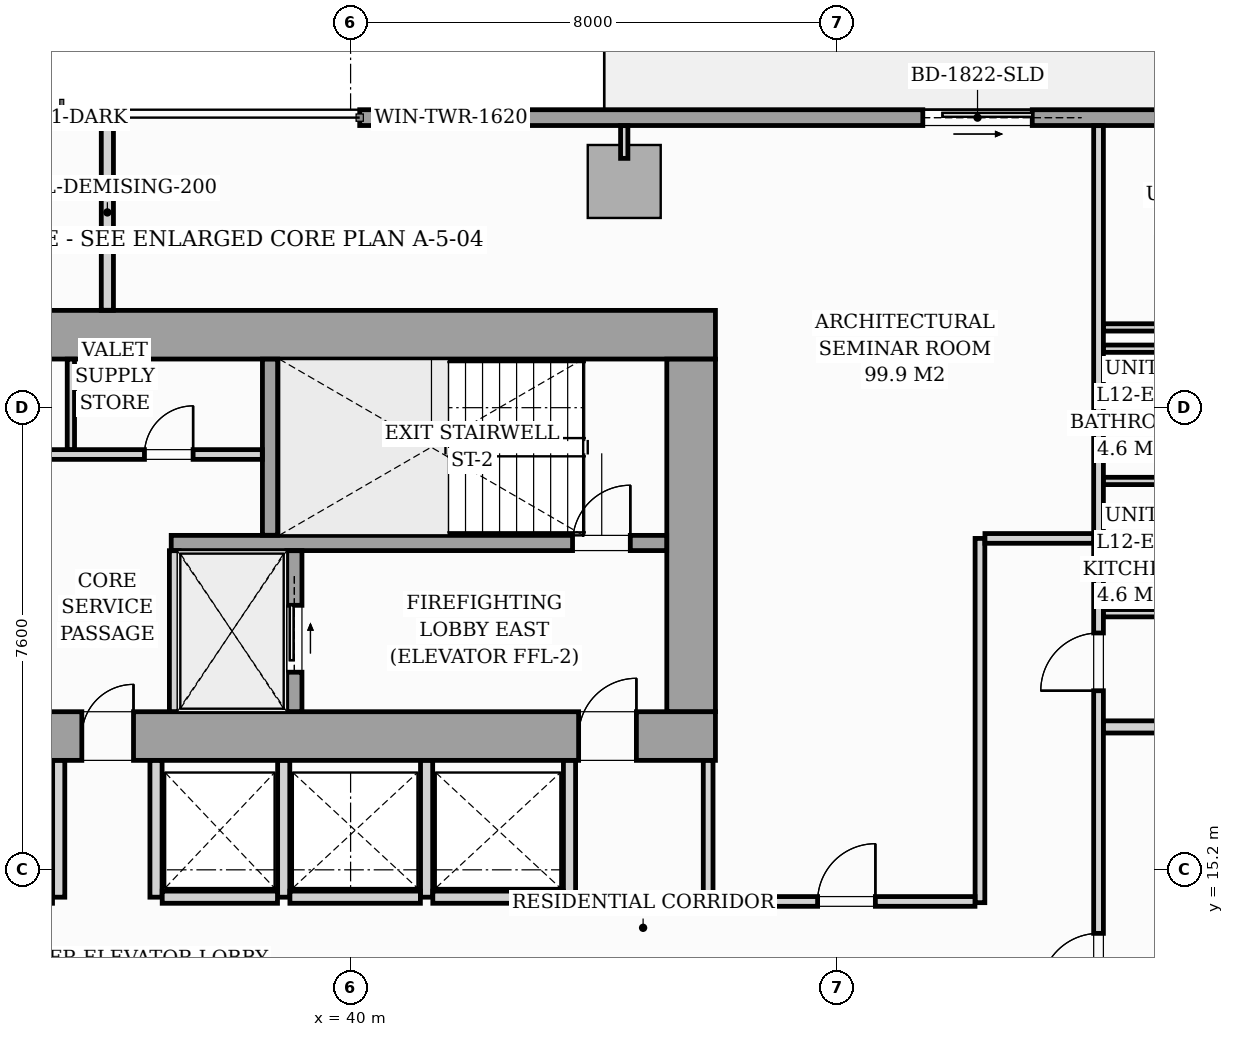
"""IFC4 building model, lengths in metres.
Left out: names, types, materials, properties, quantities, classifications, styles, units other than length and angle.
Written with IfcOpenShell. Run it as: python <this file> out.ifc"""

import sys

from ifc_helpers import new_model, si_unit, direction, frame, frame_2d, origin, origin_2d, place, context, subcontext, project, spatial, rectangle, i_section, extrude, source, transform, mapped, element, fill, save


model = new_model("IFC4")
c1 = context("Model", 3, precision=1e-05, world=origin(), true_north=direction((0.0, 1.0)))
c2 = subcontext(c1, "Body", "Model", "MODEL_VIEW")
j1 = project(units=[si_unit("LENGTHUNIT", "METRE"), si_unit("PLANEANGLEUNIT", "RADIAN")], contexts=[c1])
p1 = place(None, origin())
s1 = spatial("IfcSite", under=j1, at=p1, CompositionType="ELEMENT")
p2 = place(p1, origin())
s2 = spatial("IfcBuilding", under=s1, at=p2, CompositionType="ELEMENT")
p3 = place(p2, frame((0.0, 0.0, 45.4)))
s3 = spatial("IfcBuildingStorey", under=s2, at=p3, CompositionType="ELEMENT", Elevation=45.4)
m1 = source(origin(), c2, "Body", "SweptSolid", [
    extrude(i_section(OverallWidth=0.437, OverallDepth=0.514, WebThickness=0.061, FlangeThickness=0.097, FilletRadius=0.018, at=origin_2d()), origin(), (0.0, 0.0, 1.0), 3.196),
])
for number, where, z_axis, x_axis in (
    (1, (38.88, 17.4, 0.002), (0.0, 0.0, 1.0), (1.0, 0.0, 0.0)),
    (2, (45.6, 17.4, 0.002), (0.0, 0.0, 1.0), (1.0, 0.0, 0.0)),
    (3, (38.88, 24.0, 0.002), (0.0, 0.0, 1.0), (1.0, 0.0, 0.0)),
    (4, (45.6, 24.0, 0.002), (0.0, 0.0, 1.0), (1.0, 0.0, 0.0)),
):
    element("IfcColumn", number, at=place(p3, frame(where, z_axis=z_axis, x_axis=x_axis)), inside=s3, PredefinedType="PILASTER", context=c2, shape_type="MappedRepresentation", body=[
        mapped(m1, transform((0.0, 0.0, 0.0), scale=1.0)),
    ])
m2 = source(origin(), c2, "Body", "SweptSolid", [
    extrude(rectangle(XDim=1.2, YDim=1.2, at=origin_2d()), origin(), (0.0, 0.0, 1.0), 3.196),
])
p4 = place(p3, frame((44.5, 26.52, 0.002), z_axis=(0.0, 0.0, 1.0), x_axis=(1.0, 0.0, 0.0)))
e5 = element("IfcColumn", 5, at=p4, inside=s3, PredefinedType="COLUMN", context=c2, shape_type="MappedRepresentation", body=[
    mapped(m2, transform((0.0, 0.0, 0.0), scale=1.0)),
])
p5 = place(p3, frame((40.15, 27.57, 0.0), z_axis=(0.0, 0.0, 1.0), x_axis=(1.0, 0.0, 0.0)))
e6 = element("IfcWall", 6, at=p5, inside=s3, PredefinedType="STANDARD", context=c2, shape_type="SweptSolid", body=[
    extrude(rectangle(XDim=17.15, YDim=0.26, at=frame_2d((8.575, 0.0))), origin(), (0.0, 0.0, 1.0), 2.94),
])
p6 = place(p5, frame((9.26, 0.0, 0.0)))
e7 = element("IfcOpeningElement", 7, at=p6, cuts=e6, PredefinedType="OPENING", context=c2, shape_type="SweptSolid", body=[
    extrude(rectangle(XDim=1.8, YDim=2.06, at=frame_2d((0.9, 1.03))), frame((0.0, 0.14, 0.0), z_axis=(0.0, -1.0, 0.0), x_axis=(1.0, 0.0, 0.0)), (0.0, 0.0, 1.0), 0.28),
])
p7 = place(p5, frame((0.7, 0.0, 0.65)))
e8 = element("IfcOpeningElement", 8, at=p7, cuts=e6, PredefinedType="OPENING", context=c2, shape_type="SweptSolid", body=[
    extrude(rectangle(XDim=1.6, YDim=1.5, at=frame_2d((0.8, 0.75))), frame((0.0, 0.14, 0.0), z_axis=(0.0, -1.0, 0.0), x_axis=(1.0, 0.0, 0.0)), (0.0, 0.0, 1.0), 0.28),
])
p8 = place(p3, frame((26.0, 17.4, 0.0), z_axis=(0.0, 0.0, 1.0), x_axis=(1.0, 0.0, 0.0)))
e9 = element("IfcWall", 9, at=p8, inside=s3, PredefinedType="SHEAR", context=c2, shape_type="SweptSolid", body=[
    extrude(rectangle(XDim=20.0, YDim=0.8, at=frame_2d((10.0, 0.0))), origin(), (0.0, 0.0, 1.0), 3.2),
])
p9 = place(p8, frame((1.15, 0.0, 0.0)))
e10 = element("IfcOpeningElement", 10, at=p9, cuts=e9, PredefinedType="OPENING", context=c2, shape_type="SweptSolid", body=[
    extrude(rectangle(XDim=0.95, YDim=2.06, at=frame_2d((0.475, 1.03))), frame((0.0, 0.41, 0.0), z_axis=(0.0, -1.0, 0.0), x_axis=(1.0, 0.0, 0.0)), (0.0, 0.0, 1.0), 0.82),
])
p10 = place(p8, frame((9.58, 0.0, 0.0)))
e11 = element("IfcOpeningElement", 11, at=p10, cuts=e9, PredefinedType="OPENING", context=c2, shape_type="SweptSolid", body=[
    extrude(rectangle(XDim=0.85, YDim=2.0, at=frame_2d((0.425, 1.0))), frame((0.0, 0.41, 0.0), z_axis=(0.0, -1.0, 0.0), x_axis=(1.0, 0.0, 0.0)), (0.0, 0.0, 1.0), 0.82),
])
p11 = place(p8, frame((17.75, 0.0, 0.0)))
e12 = element("IfcOpeningElement", 12, at=p11, cuts=e9, PredefinedType="OPENING", context=c2, shape_type="SweptSolid", body=[
    extrude(rectangle(XDim=0.95, YDim=2.06, at=frame_2d((0.475, 1.03))), frame((0.0, 0.41, 0.0), z_axis=(0.0, -1.0, 0.0), x_axis=(1.0, 0.0, 0.0)), (0.0, 0.0, 1.0), 0.82),
])
p12 = place(p3, frame((26.0, 24.0, 0.0), z_axis=(0.0, 0.0, 1.0), x_axis=(1.0, 0.0, 0.0)))
e13 = element("IfcWall", 13, at=p12, inside=s3, PredefinedType="SHEAR", context=c2, shape_type="SweptSolid", body=[
    extrude(rectangle(XDim=20.0, YDim=0.8, at=frame_2d((10.0, 0.0))), origin(), (0.0, 0.0, 1.0), 3.2),
])
p13 = place(p3, frame((45.6, 17.802, 0.0), z_axis=(0.0, 0.0, 1.0), x_axis=(0.0, 1.0, 0.0)))
e14 = element("IfcWall", 14, at=p13, inside=s3, PredefinedType="SHEAR", context=c2, shape_type="SweptSolid", body=[
    extrude(rectangle(XDim=5.796, YDim=0.8, at=frame_2d((2.898, 0.0))), origin(), (0.0, 0.0, 1.0), 3.2),
])
p14 = place(p3, frame((37.05, 20.575, 0.0), z_axis=(0.0, 0.0, 1.0), x_axis=(1.0, 0.0, 0.0)))
e15 = element("IfcWall", 15, at=p14, inside=s3, PredefinedType="SOLIDWALL", context=c2, shape_type="SweptSolid", body=[
    extrude(rectangle(XDim=8.148, YDim=0.25, at=frame_2d((4.074, 0.0))), origin(), (0.0, 0.0, 1.0), 3.2),
])
p15 = place(p14, frame((6.6, 0.0, 0.0)))
e16 = element("IfcOpeningElement", 16, at=p15, cuts=e15, PredefinedType="OPENING", context=c2, shape_type="SweptSolid", body=[
    extrude(rectangle(XDim=0.95, YDim=2.06, at=frame_2d((0.475, 1.03))), frame((0.0, 0.135, 0.0), z_axis=(0.0, -1.0, 0.0), x_axis=(1.0, 0.0, 0.0)), (0.0, 0.0, 1.0), 0.27),
])
p16 = place(p3, frame((38.675, 20.702, 0.0), z_axis=(0.0, 0.0, 1.0), x_axis=(0.0, 1.0, 0.0)))
e17 = element("IfcWall", 17, at=p16, inside=s3, PredefinedType="SOLIDWALL", context=c2, shape_type="SweptSolid", body=[
    extrude(rectangle(XDim=2.896, YDim=0.25, at=frame_2d((1.448, 0.0))), origin(), (0.0, 0.0, 1.0), 3.2),
])
p17 = place(p3, frame((37.1, 17.802, 0.0), z_axis=(0.0, 0.0, 1.0), x_axis=(0.0, 1.0, 0.0)))
e18 = element("IfcWall", 18, at=p17, inside=s3, PredefinedType="PARTITIONING", context=c2, shape_type="SweptSolid", body=[
    extrude(rectangle(XDim=2.646, YDim=0.16, at=frame_2d((1.323, 0.0))), origin(), (0.0, 0.0, 1.0), 2.94),
])
p18 = place(p3, frame((39.075, 17.802, 0.0), z_axis=(0.0, 0.0, 1.0), x_axis=(0.0, 1.0, 0.0)))
e19 = element("IfcWall", 19, at=p18, inside=s3, PredefinedType="SOLIDWALL", context=c2, shape_type="SweptSolid", body=[
    extrude(rectangle(XDim=2.646, YDim=0.25, at=frame_2d((1.323, 0.0))), origin(), (0.0, 0.0, 1.0), 3.2),
])
p19 = place(p18, frame((0.648, 0.0, 0.0)))
e20 = element("IfcOpeningElement", 20, at=p19, cuts=e19, PredefinedType="OPENING", context=c2, shape_type="SweptSolid", body=[
    extrude(rectangle(XDim=1.1, YDim=2.08, at=frame_2d((0.55, 1.04))), frame((0.0, 0.135, 0.0), z_axis=(0.0, -1.0, 0.0), x_axis=(1.0, 0.0, 0.0)), (0.0, 0.0, 1.0), 0.27),
])
p20 = place(p3, frame((33.452, 22.03, 0.0), z_axis=(0.0, 0.0, 1.0), x_axis=(1.0, 0.0, 0.0)))
e21 = element("IfcWall", 21, at=p20, inside=s3, PredefinedType="PARTITIONING", context=c2, shape_type="SweptSolid", body=[
    extrude(rectangle(XDim=5.096, YDim=0.16, at=frame_2d((2.548, 0.0))), origin(), (0.0, 0.0, 1.0), 2.94),
])
p21 = place(p20, frame((0.538, 0.0, 0.0)))
e22 = element("IfcOpeningElement", 22, at=p21, cuts=e21, PredefinedType="OPENING", context=c2, shape_type="SweptSolid", body=[
    extrude(rectangle(XDim=0.8, YDim=2.05, at=frame_2d((0.4, 1.025))), frame((0.0, 0.09, 0.0), z_axis=(0.0, -1.0, 0.0), x_axis=(1.0, 0.0, 0.0)), (0.0, 0.0, 1.0), 0.18),
])
p22 = place(p20, frame((3.158, 0.0, 0.0)))
e23 = element("IfcOpeningElement", 23, at=p22, cuts=e21, PredefinedType="OPENING", context=c2, shape_type="SweptSolid", body=[
    extrude(rectangle(XDim=0.8, YDim=2.05, at=frame_2d((0.4, 1.025))), frame((0.0, 0.09, 0.0), z_axis=(0.0, -1.0, 0.0), x_axis=(1.0, 0.0, 0.0)), (0.0, 0.0, 1.0), 0.18),
])
p23 = place(p3, frame((35.4, 22.112, 0.0), z_axis=(0.0, 0.0, 1.0), x_axis=(0.0, 1.0, 0.0)))
e24 = element("IfcWall", 24, at=p23, inside=s3, PredefinedType="PARTITIONING", context=c2, shape_type="SweptSolid", body=[
    extrude(rectangle(XDim=1.486, YDim=0.12, at=frame_2d((0.743, 0.0))), origin(), (0.0, 0.0, 1.0), 2.94),
])
for number, where, z_axis, x_axis in (
    (25, (35.2, 14.75, 0.0), (0.0, 0.0, 1.0), (0.0, 1.0, 0.0)),
    (26, (36.8, 14.75, 0.0), (0.0, 0.0, 1.0), (0.0, 1.0, 0.0)),
    (27, (38.9, 14.75, 0.0), (0.0, 0.0, 1.0), (0.0, 1.0, 0.0)),
):
    element("IfcWall", number, at=place(p3, frame(where, z_axis=z_axis, x_axis=x_axis)), inside=s3, PredefinedType="PARTITIONING", context=c2, shape_type="SweptSolid", body=[
        extrude(rectangle(XDim=2.248, YDim=0.2, at=frame_2d((1.124, 0.0))), origin(), (0.0, 0.0, 1.0), 2.94),
    ])
p24 = place(p3, frame((36.902, 14.75, 0.0), z_axis=(0.0, 0.0, 1.0), x_axis=(1.0, 0.0, 0.0)))
e28 = element("IfcWall", 28, at=p24, inside=s3, PredefinedType="PARTITIONING", context=c2, shape_type="SweptSolid", body=[
    extrude(rectangle(XDim=1.896, YDim=0.2, at=frame_2d((0.948, 0.0))), origin(), (0.0, 0.0, 1.0), 2.94),
])
for number, where, z_axis, x_axis in (
    (29, (41.25, 14.75, 0.0), (0.0, 0.0, 1.0), (0.0, 1.0, 0.0)),
    (30, (43.6, 14.75, 0.0), (0.0, 0.0, 1.0), (0.0, 1.0, 0.0)),
):
    element("IfcWall", number, at=place(p3, frame(where, z_axis=z_axis, x_axis=x_axis)), inside=s3, PredefinedType="PARTITIONING", context=c2, shape_type="SweptSolid", body=[
        extrude(rectangle(XDim=2.248, YDim=0.2, at=frame_2d((1.124, 0.0))), origin(), (0.0, 0.0, 1.0), 2.94),
    ])
for number, where, z_axis, x_axis in (
    (31, (39.002, 14.75, 0.0), (0.0, 0.0, 1.0), (1.0, 0.0, 0.0)),
    (32, (41.352, 14.75, 0.0), (0.0, 0.0, 1.0), (1.0, 0.0, 0.0)),
):
    element("IfcWall", number, at=place(p3, frame(where, z_axis=z_axis, x_axis=x_axis)), inside=s3, PredefinedType="PARTITIONING", context=c2, shape_type="SweptSolid", body=[
        extrude(rectangle(XDim=2.146, YDim=0.2, at=frame_2d((1.073, 0.0))), origin(), (0.0, 0.0, 1.0), 2.94),
    ])
p25 = place(p3, frame((52.3, 12.712, 0.0), z_axis=(0.0, 0.0, 1.0), x_axis=(0.0, 1.0, 0.0)))
e33 = element("IfcWall", 33, at=p25, inside=s3, PredefinedType="PARTITIONING", context=c2, shape_type="SweptSolid", body=[
    extrude(rectangle(XDim=14.726, YDim=0.16, at=frame_2d((7.363, 0.0))), origin(), (0.0, 0.0, 1.0), 2.94),
])
p26 = place(p25, frame((0.493, 0.0, 0.0)))
e34 = element("IfcOpeningElement", 34, at=p26, cuts=e33, PredefinedType="OPENING", context=c2, shape_type="SweptSolid", body=[
    extrude(rectangle(XDim=0.95, YDim=2.06, at=frame_2d((0.475, 1.03))), frame((0.0, 0.09, 0.0), z_axis=(0.0, -1.0, 0.0), x_axis=(1.0, 0.0, 0.0)), (0.0, 0.0, 1.0), 0.18),
])
p27 = place(p25, frame((5.433, 0.0, 0.0)))
e35 = element("IfcOpeningElement", 35, at=p27, cuts=e33, PredefinedType="OPENING", context=c2, shape_type="SweptSolid", body=[
    extrude(rectangle(XDim=0.95, YDim=2.06, at=frame_2d((0.475, 1.03))), frame((0.0, 0.09, 0.0), z_axis=(0.0, -1.0, 0.0), x_axis=(1.0, 0.0, 0.0)), (0.0, 0.0, 1.0), 0.18),
])
p28 = place(p3, frame((36.0, 24.402, 0.0), z_axis=(0.0, 0.0, 1.0), x_axis=(0.0, 1.0, 0.0)))
e36 = element("IfcWall", 36, at=p28, inside=s3, PredefinedType="PARTITIONING", context=c2, shape_type="SweptSolid", body=[
    extrude(rectangle(XDim=3.218, YDim=0.2, at=frame_2d((1.609, 0.0))), origin(), (0.0, 0.0, 1.0), 2.94),
])
p29 = place(p3, frame((52.382, 17.55, 0.0), z_axis=(0.0, 0.0, 1.0), x_axis=(1.0, 0.0, 0.0)))
e37 = element("IfcWall", 37, at=p29, inside=s3, PredefinedType="PARTITIONING", context=c2, shape_type="SweptSolid", body=[
    extrude(rectangle(XDim=7.338, YDim=0.2, at=frame_2d((3.669, 0.0))), origin(), (0.0, 0.0, 1.0), 2.94),
])
for number, where, z_axis, x_axis in (
    (38, (52.382, 21.595, 0.0), (0.0, 0.0, 1.0), (1.0, 0.0, 0.0)),
    (39, (52.382, 19.42, 0.0), (0.0, 0.0, 1.0), (1.0, 0.0, 0.0)),
    (40, (52.382, 23.77, 0.0), (0.0, 0.0, 1.0), (1.0, 0.0, 0.0)),
):
    element("IfcWall", number, at=place(p3, frame(where, z_axis=z_axis, x_axis=x_axis)), inside=s3, PredefinedType="PARTITIONING", context=c2, shape_type="SweptSolid", body=[
        extrude(rectangle(XDim=2.256, YDim=0.12, at=frame_2d((1.128, 0.0))), origin(), (0.0, 0.0, 1.0), 2.94),
    ])
p30 = place(p3, frame((52.382, 24.12, 0.0), z_axis=(0.0, 0.0, 1.0), x_axis=(1.0, 0.0, 0.0)))
e41 = element("IfcWall", 41, at=p30, inside=s3, PredefinedType="PARTITIONING", context=c2, shape_type="SweptSolid", body=[
    extrude(rectangle(XDim=7.338, YDim=0.12, at=frame_2d((3.669, 0.0))), origin(), (0.0, 0.0, 1.0), 2.94),
])
p31 = place(p30, frame((3.253, 0.0, 0.0)))
e42 = element("IfcOpeningElement", 42, at=p31, cuts=e41, PredefinedType="OPENING", context=c2, shape_type="SweptSolid", body=[
    extrude(rectangle(XDim=0.85, YDim=2.05, at=frame_2d((0.425, 1.025))), frame((0.0, 0.07, 0.0), z_axis=(0.0, -1.0, 0.0), x_axis=(1.0, 0.0, 0.0)), (0.0, 0.0, 1.0), 0.14),
])
p32 = place(p3, frame((50.35, 14.66, 0.0), z_axis=(0.0, 0.0, 1.0), x_axis=(0.0, 1.0, 0.0)))
e43 = element("IfcWall", 43, at=p32, inside=s3, PredefinedType="PARTITIONING", context=c2, shape_type="SweptSolid", body=[
    extrude(rectangle(XDim=5.99, YDim=0.16, at=frame_2d((2.995, 0.0))), origin(), (0.0, 0.0, 1.0), 2.94),
])
p33 = place(p3, frame((50.432, 20.65, 0.0), z_axis=(0.0, 0.0, 1.0), x_axis=(1.0, 0.0, 0.0)))
e44 = element("IfcWall", 44, at=p33, inside=s3, PredefinedType="PARTITIONING", context=c2, shape_type="SweptSolid", body=[
    extrude(rectangle(XDim=1.786, YDim=0.16, at=frame_2d((0.893, 0.0))), origin(), (0.0, 0.0, 1.0), 2.94),
])
p34 = place(p3, frame((45.84, 14.68, 0.0), z_axis=(0.0, 0.0, 1.0), x_axis=(1.0, 0.0, 0.0)))
e45 = element("IfcWall", 45, at=p34, inside=s3, PredefinedType="PARTITIONING", context=c2, shape_type="SweptSolid", body=[
    extrude(rectangle(XDim=4.428, YDim=0.16, at=frame_2d((2.214, 0.0))), origin(), (0.0, 0.0, 1.0), 2.94),
])
p35 = place(p34, frame((1.84, 0.0, 0.0)))
e46 = element("IfcOpeningElement", 46, at=p35, cuts=e45, PredefinedType="OPENING", context=c2, shape_type="SweptSolid", body=[
    extrude(rectangle(XDim=0.95, YDim=2.06, at=frame_2d((0.475, 1.03))), frame((0.0, 0.09, 0.0), z_axis=(0.0, -1.0, 0.0), x_axis=(1.0, 0.0, 0.0)), (0.0, 0.0, 1.0), 0.18),
])
p36 = place(p3, frame((45.88, 14.762, 0.0), z_axis=(0.0, 0.0, 1.0), x_axis=(0.0, 1.0, 0.0)))
e47 = element("IfcWall", 47, at=p36, inside=s3, PredefinedType="PARTITIONING", context=c2, shape_type="SweptSolid", body=[
    extrude(rectangle(XDim=2.236, YDim=0.16, at=frame_2d((1.118, 0.0))), origin(), (0.0, 0.0, 1.0), 2.94),
])
p37 = place(p3, frame((44.5, 26.9, 0.0), z_axis=(0.0, 0.0, 1.0), x_axis=(0.0, 1.0, 0.0)))
e48 = element("IfcWall", 48, at=p37, inside=s3, PredefinedType="PARTITIONING", context=c2, shape_type="SweptSolid", body=[
    extrude(rectangle(XDim=0.538, YDim=0.12, at=frame_2d((0.269, 0.0))), origin(), (0.0, 0.0, 1.0), 2.94),
])
m3 = source(origin(), c2, "Body", "SweptSolid", [
    extrude(rectangle(XDim=1.8, YDim=2.06, at=frame_2d((0.9, 1.03))), frame((0.0, 0.025, 0.0), z_axis=(0.0, -1.0, 0.0), x_axis=(1.0, 0.0, 0.0)), (0.0, 0.0, 1.0), 0.05),
])
p38 = place(p6, origin())
e49 = element("IfcDoor", 49, at=p38, inside=s3, OperationType="SLIDING_TO_RIGHT", PredefinedType="DOOR", context=c2, shape_type="MappedRepresentation", body=[
    mapped(m3, transform((0.0, 0.0, 0.0), scale=1.0)),
])
fill(e7, e49)
m4 = source(origin(), c2, "Body", "SweptSolid", [
    extrude(rectangle(XDim=1.6, YDim=1.5, at=frame_2d((0.8, 0.75))), frame((0.0, 0.03, 0.0), z_axis=(0.0, -1.0, 0.0), x_axis=(1.0, 0.0, 0.0)), (0.0, 0.0, 1.0), 0.06),
])
p39 = place(p7, origin())
e50 = element("IfcWindow", 50, at=p39, inside=s3, PartitioningType="SINGLE_PANEL", PredefinedType="WINDOW", context=c2, shape_type="MappedRepresentation", body=[
    mapped(m4, transform((0.0, 0.0, 0.0), scale=1.0)),
])
fill(e8, e50)
m5 = source(origin(), c2, "Body", "SweptSolid", [
    extrude(rectangle(XDim=0.85, YDim=2.0, at=frame_2d((0.425, 1.0))), frame((0.0, 0.025, 0.0), z_axis=(0.0, -1.0, 0.0), x_axis=(1.0, 0.0, 0.0)), (0.0, 0.0, 1.0), 0.05),
])
p40 = place(p10, origin())
e51 = element("IfcDoor", 51, at=p40, inside=s3, OperationType="SINGLE_SWING_RIGHT", PredefinedType="DOOR", context=c2, shape_type="MappedRepresentation", body=[
    mapped(m5, transform((0.0, 0.0, 0.0), scale=1.0)),
])
fill(e11, e51)
m6 = source(origin(), c2, "Body", "SweptSolid", [
    extrude(rectangle(XDim=0.95, YDim=2.06, at=frame_2d((0.475, 1.03))), frame((0.0, 0.025, 0.0), z_axis=(0.0, -1.0, 0.0), x_axis=(1.0, 0.0, 0.0)), (0.0, 0.0, 1.0), 0.05),
])
p41 = place(p11, origin())
e52 = element("IfcDoor", 52, at=p41, inside=s3, OperationType="SINGLE_SWING_RIGHT", PredefinedType="DOOR", context=c2, shape_type="MappedRepresentation", body=[
    mapped(m6, transform((0.0, 0.0, 0.0), scale=1.0)),
])
fill(e12, e52)
p42 = place(p15, origin())
e53 = element("IfcDoor", 53, at=p42, inside=s3, OperationType="SINGLE_SWING_RIGHT", PredefinedType="DOOR", context=c2, shape_type="MappedRepresentation", body=[
    mapped(m6, transform((0.0, 0.0, 0.0), scale=1.0)),
])
fill(e16, e53)
m7 = source(origin(), c2, "Body", "SweptSolid", [
    extrude(rectangle(XDim=1.1, YDim=2.08, at=frame_2d((0.55, 1.04))), frame((0.0, 0.025, 0.0), z_axis=(0.0, -1.0, 0.0), x_axis=(1.0, 0.0, 0.0)), (0.0, 0.0, 1.0), 0.05),
])
p43 = place(p19, origin())
e54 = element("IfcDoor", 54, at=p43, inside=s3, OperationType="SLIDING_TO_RIGHT", PredefinedType="DOOR", context=c2, shape_type="MappedRepresentation", body=[
    mapped(m7, transform((0.0, 0.0, 0.0), scale=1.0)),
])
fill(e20, e54)
m8 = source(origin(), c2, "Body", "SweptSolid", [
    extrude(rectangle(XDim=0.8, YDim=2.05, at=frame_2d((0.4, 1.025))), frame((0.0, 0.025, 0.0), z_axis=(0.0, -1.0, 0.0), x_axis=(1.0, 0.0, 0.0)), (0.0, 0.0, 1.0), 0.05),
])
p44 = place(p22, origin())
e55 = element("IfcDoor", 55, at=p44, inside=s3, OperationType="SINGLE_SWING_RIGHT", PredefinedType="DOOR", context=c2, shape_type="MappedRepresentation", body=[
    mapped(m8, transform((0.0, 0.0, 0.0), scale=1.0)),
])
fill(e23, e55)
m9 = source(origin(), c2, "Body", "SweptSolid", [
    extrude(rectangle(XDim=0.95, YDim=2.06, at=frame_2d((0.475, 1.03))), frame((0.0, 0.025, 0.0), z_axis=(0.0, -1.0, 0.0), x_axis=(1.0, 0.0, 0.0)), (0.0, 0.0, 1.0), 0.05),
])
p45 = place(p26, origin())
e56 = element("IfcDoor", 56, at=p45, inside=s3, OperationType="SINGLE_SWING_LEFT", PredefinedType="DOOR", context=c2, shape_type="MappedRepresentation", body=[
    mapped(m9, transform((0.0, 0.0, 0.0), scale=1.0)),
])
fill(e34, e56)
p46 = place(p27, origin())
e57 = element("IfcDoor", 57, at=p46, inside=s3, OperationType="SINGLE_SWING_LEFT", PredefinedType="DOOR", context=c2, shape_type="MappedRepresentation", body=[
    mapped(m9, transform((0.0, 0.0, 0.0), scale=1.0)),
])
fill(e35, e57)
p47 = place(p35, origin())
e58 = element("IfcDoor", 58, at=p47, inside=s3, OperationType="SINGLE_SWING_RIGHT", PredefinedType="DOOR", context=c2, shape_type="MappedRepresentation", body=[
    mapped(m9, transform((0.0, 0.0, 0.0), scale=1.0)),
])
fill(e46, e58)
save(model, sys.argv[1])
